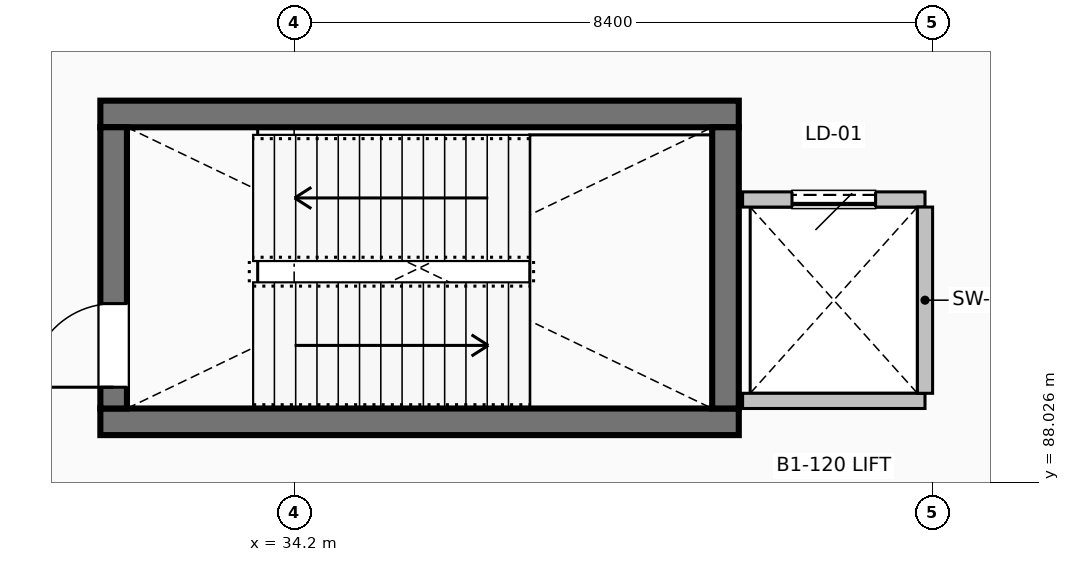
"""IFC4 building model, lengths in metres.
Left out: names, types, materials, properties, quantities, classifications, styles, units other than length and angle.
Written with IfcOpenShell. Run it as: python <this file> out.ifc"""

import sys

from ifc_helpers import new_model, si_unit, direction, frame, frame_2d, origin, place, context, subcontext, project, spatial, rectangle, extrude, element, fill, save


model = new_model("IFC4")
c1 = context("Model", 3, precision=1e-05, world=origin(), true_north=direction((0.0, 1.0)))
c2 = subcontext(c1, "Body", "Model", "MODEL_VIEW")
j1 = project(units=[si_unit("LENGTHUNIT", "METRE"), si_unit("PLANEANGLEUNIT", "RADIAN")], contexts=[c1])
p1 = place(None, origin())
s1 = spatial("IfcSite", under=j1, at=p1, CompositionType="ELEMENT")
p2 = place(p1, origin())
s2 = spatial("IfcBuilding", under=s1, at=p2, CompositionType="ELEMENT")
p3 = place(p2, frame((0.0, 0.0, -4.8)))
s3 = spatial("IfcBuildingStorey", under=s2, at=p3, CompositionType="ELEMENT", Elevation=-4.8)
for number, where, z_axis, x_axis in (
    (1, (31.65, 88.825, 0.0), (0.0, 0.0, 1.0), (1.0, 0.0, 0.0)),
    (2, (40.05, 92.875, 0.0), (0.0, 0.0, 1.0), (-1.0, 0.0, 0.0)),
):
    element("IfcWall", number, at=place(p3, frame(where, z_axis=z_axis, x_axis=x_axis)), inside=s3, PredefinedType="SHEAR", context=c2, shape_type="SweptSolid", body=[
        extrude(rectangle(XDim=8.4, YDim=0.35, at=frame_2d((4.2, 0.0))), origin(), (0.0, 0.0, 1.0), 4.5),
    ])
p4 = place(p3, frame((31.825, 89.0, 0.0), z_axis=(0.0, 0.0, 1.0), x_axis=(0.0, 1.0, 0.0)))
e3 = element("IfcWall", 3, at=p4, inside=s3, PredefinedType="SHEAR", context=c2, shape_type="SweptSolid", body=[
    extrude(rectangle(XDim=3.7, YDim=0.35, at=frame_2d((1.85, 0.0))), origin(), (0.0, 0.0, 1.0), 4.5),
])
p5 = place(p4, frame((0.28, 0.0, 0.0)))
e4 = element("IfcOpeningElement", 4, at=p5, cuts=e3, PredefinedType="OPENING", context=c2, shape_type="SweptSolid", body=[
    extrude(rectangle(XDim=1.1, YDim=2.08, at=frame_2d((0.55, 1.04))), frame((0.0, 0.185, 0.0), z_axis=(0.0, -1.0, 0.0), x_axis=(1.0, 0.0, 0.0)), (0.0, 0.0, 1.0), 0.37),
])
p6 = place(p3, frame((39.875, 92.7, 0.0), z_axis=(0.0, 0.0, 1.0), x_axis=(0.0, -1.0, 0.0)))
e5 = element("IfcWall", 5, at=p6, inside=s3, PredefinedType="SHEAR", context=c2, shape_type="SweptSolid", body=[
    extrude(rectangle(XDim=3.7, YDim=0.35, at=frame_2d((1.85, 0.0))), origin(), (0.0, 0.0, 1.0), 4.5),
])
p7 = place(p3, frame((40.1, 89.1, 0.0), z_axis=(0.0, 0.0, 1.0), x_axis=(1.0, 0.0, 0.0)))
e6 = element("IfcWall", 6, at=p7, inside=s3, PredefinedType="PARTITIONING", context=c2, shape_type="SweptSolid", body=[
    extrude(rectangle(XDim=2.4, YDim=0.2, at=frame_2d((1.2, 0.0))), origin(), (0.0, 0.0, 1.0), 4.492),
])
p8 = place(p3, frame((42.5, 91.75, 0.0), z_axis=(0.0, 0.0, 1.0), x_axis=(-1.0, 0.0, 0.0)))
e7 = element("IfcWall", 7, at=p8, inside=s3, PredefinedType="PARTITIONING", context=c2, shape_type="SweptSolid", body=[
    extrude(rectangle(XDim=2.4, YDim=0.2, at=frame_2d((1.2, 0.0))), origin(), (0.0, 0.0, 1.0), 4.492),
])
p9 = place(p8, frame((0.65, 0.0, 0.0)))
e8 = element("IfcOpeningElement", 8, at=p9, cuts=e7, PredefinedType="OPENING", context=c2, shape_type="SweptSolid", body=[
    extrude(rectangle(XDim=1.1, YDim=2.15, at=frame_2d((0.55, 1.075))), frame((0.0, 0.11, 0.0), z_axis=(0.0, -1.0, 0.0), x_axis=(1.0, 0.0, 0.0)), (0.0, 0.0, 1.0), 0.22),
])
p10 = place(p3, frame((42.5, 91.65, 0.0), z_axis=(0.0, 0.0, 1.0), x_axis=(0.0, -1.0, 0.0)))
e9 = element("IfcWall", 9, at=p10, inside=s3, PredefinedType="PARTITIONING", context=c2, shape_type="SweptSolid", body=[
    extrude(rectangle(XDim=2.45, YDim=0.2, at=frame_2d((1.225, 0.0))), origin(), (0.0, 0.0, 1.0), 3.592),
])
p11 = place(p5, origin())
e10 = element("IfcDoor", 10, at=p11, inside=s3, OperationType="SINGLE_SWING_LEFT", PredefinedType="DOOR", context=c2, shape_type="SweptSolid", body=[
    extrude(rectangle(XDim=1.1, YDim=2.08, at=frame_2d((0.55, 1.04))), frame((0.0, 0.025, 0.0), z_axis=(0.0, -1.0, 0.0), x_axis=(1.0, 0.0, 0.0)), (0.0, 0.0, 1.0), 0.05),
])
fill(e4, e10)
p12 = place(p9, origin())
e11 = element("IfcDoor", 11, at=p12, inside=s3, OperationType="SLIDING_TO_LEFT", PredefinedType="DOOR", context=c2, shape_type="SweptSolid", body=[
    extrude(rectangle(XDim=1.1, YDim=2.15, at=frame_2d((0.55, 1.075))), frame((0.0, 0.025, 0.0), z_axis=(0.0, -1.0, 0.0), x_axis=(1.0, 0.0, 0.0)), (0.0, 0.0, 1.0), 0.05),
])
fill(e8, e11)
save(model, sys.argv[1])
